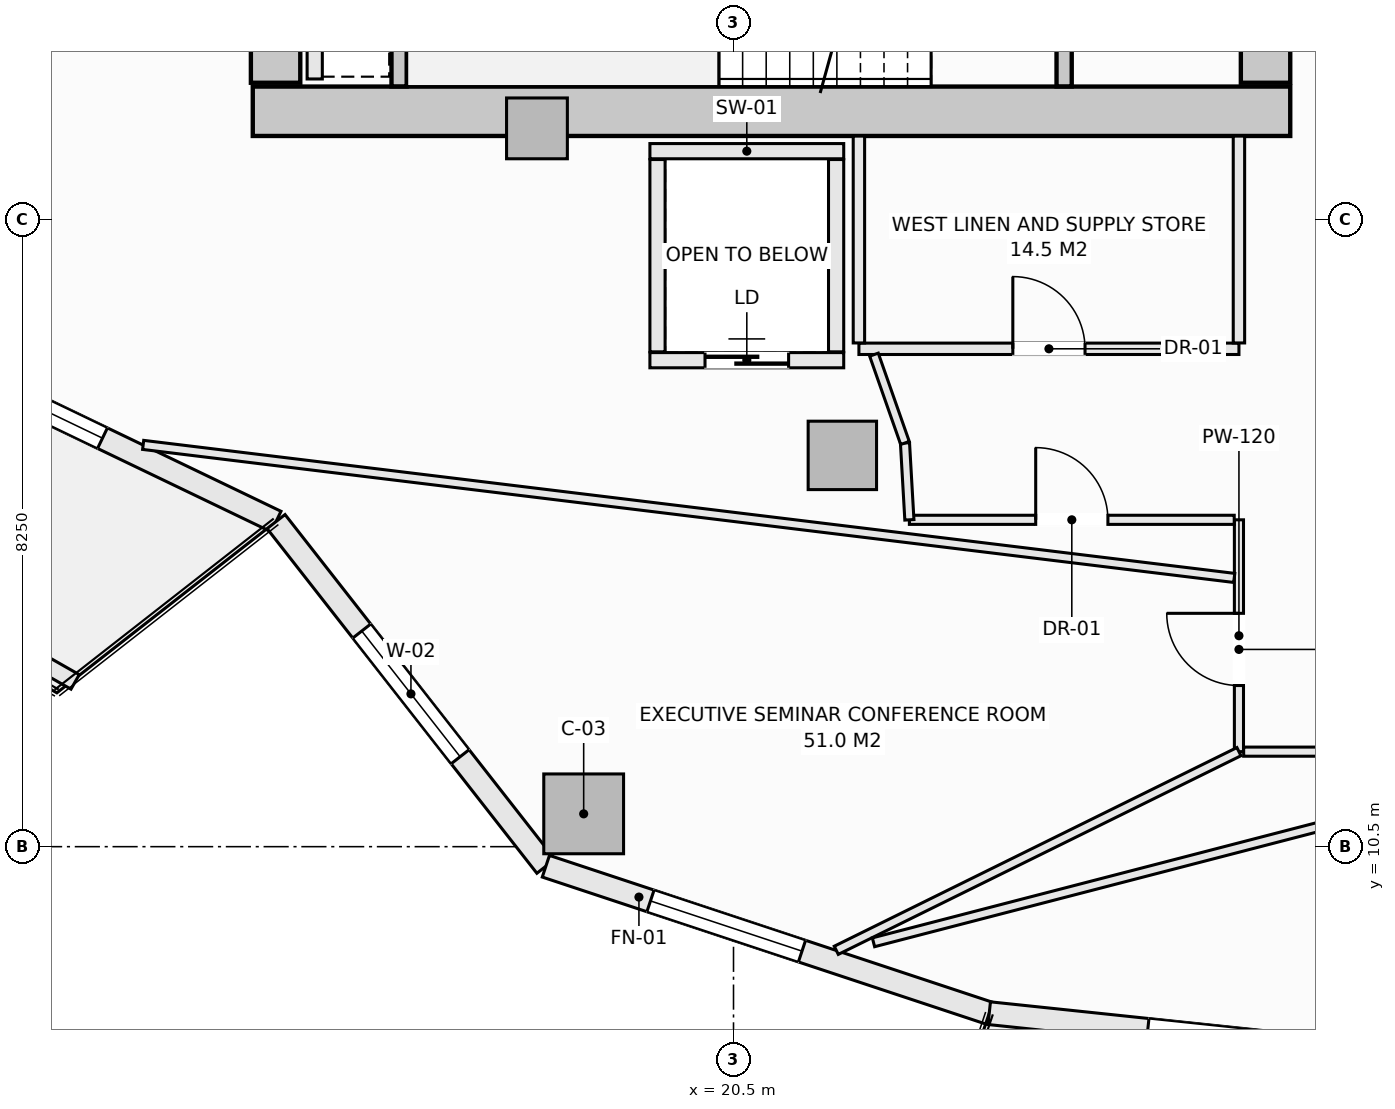
"""IFC4 building model, lengths in metres.
Left out: names, types, materials, properties, quantities, classifications, styles, units other than length and angle.
Written with IfcOpenShell. Run it as: python <this file> out.ifc"""

import sys

from ifc_helpers import new_model, si_unit, direction, frame, frame_2d, origin, origin_2d, place, context, subcontext, project, spatial, rectangle, extrude, element, fill, save


model = new_model("IFC4")
c1 = context("Model", 3, precision=1e-05, world=origin(), true_north=direction((0.0, 1.0)))
c2 = subcontext(c1, "Body", "Model", "MODEL_VIEW")
j1 = project(units=[si_unit("LENGTHUNIT", "METRE"), si_unit("PLANEANGLEUNIT", "RADIAN")], contexts=[c1])
p1 = place(None, origin())
s1 = spatial("IfcSite", under=j1, at=p1, CompositionType="ELEMENT")
p2 = place(p1, origin())
s2 = spatial("IfcBuilding", under=s1, at=p2, CompositionType="ELEMENT")
p3 = place(p2, frame((0.0, 0.0, 118.9)))
s3 = spatial("IfcBuildingStorey", under=s2, at=p3, CompositionType="ELEMENT", Elevation=118.9)
p4 = place(p3, frame((14.175, 20.175, -0.27), z_axis=(0.0, 0.0, 1.0), x_axis=(1.0, 0.0, 0.0)))
e1 = element("IfcWall", 1, at=p4, inside=s3, PredefinedType="SHEAR", context=c2, shape_type="SweptSolid", body=[
    extrude(rectangle(XDim=13.65, YDim=0.65, at=frame_2d((6.825, 0.0))), origin(), (0.0, 0.0, 1.0), 3.4),
])
p5 = place(p3, frame((14.475, 20.55, -0.27), z_axis=(0.0, 0.0, 1.0), x_axis=(0.0, 1.0, 0.0)))
e2 = element("IfcWall", 2, at=p5, inside=s3, PredefinedType="SHEAR", context=c2, shape_type="SweptSolid", body=[
    extrude(rectangle(XDim=12.9, YDim=0.65, at=frame_2d((6.45, 0.0))), origin(), (0.0, 0.0, 1.0), 3.4),
])
p6 = place(p3, frame((27.5, 20.55, -0.27), z_axis=(0.0, 0.0, 1.0), x_axis=(0.0, 1.0, 0.0)))
e3 = element("IfcWall", 3, at=p6, inside=s3, PredefinedType="SHEAR", context=c2, shape_type="SweptSolid", body=[
    extrude(rectangle(XDim=1.5, YDim=0.65, at=frame_2d((0.75, 0.0))), origin(), (0.0, 0.0, 1.0), 3.4),
])
p7 = place(p3, frame((18.529, 10.932, -0.27), z_axis=(0.0, 0.0, 1.0), x_axis=(1.0, 0.0, 0.0)))
e4 = element("IfcColumn", 4, at=p7, inside=s3, PredefinedType="COLUMN", context=c2, shape_type="SweptSolid", body=[
    extrude(rectangle(XDim=1.05, YDim=1.05, at=origin_2d()), origin(), (0.0, 0.0, 1.0), 3.4),
])
p8 = place(p3, frame((21.932, 15.648, -0.27), z_axis=(0.0, 0.0, 1.0), x_axis=(1.0, 0.0, 0.0)))
e5 = element("IfcColumn", 5, at=p8, inside=s3, PredefinedType="COLUMN", context=c2, shape_type="SweptSolid", body=[
    extrude(rectangle(XDim=0.9, YDim=0.9, at=origin_2d()), origin(), (0.0, 0.0, 1.0), 3.4),
])
p9 = place(p3, frame((17.914, 19.95, -0.27), z_axis=(0.0, 0.0, 1.0), x_axis=(1.0, 0.0, 0.0)))
e6 = element("IfcColumn", 6, at=p9, inside=s3, PredefinedType="PILASTER", context=c2, shape_type="SweptSolid", body=[
    extrude(rectangle(XDim=0.8, YDim=0.8, at=origin_2d()), origin(), (0.0, 0.0, 1.0), 3.4),
])
p10 = place(p3, frame((9.178, 17.325, 0.0), z_axis=(0.0, 0.0, 1.0), x_axis=(0.901370184739, -0.433049408339, 0.0)))
e7 = element("IfcWall", 7, at=p10, inside=s3, PredefinedType="SOLIDWALL", context=c2, shape_type="SweptSolid", body=[
    extrude(rectangle(XDim=5.884, YDim=0.3, at=frame_2d((2.942, 0.0))), origin(), (0.0, 0.0, 1.0), 2.653),
])
p11 = place(p10, frame((1.25, 0.0, 0.74)))
e8 = element("IfcOpeningElement", 8, at=p11, cuts=e7, PredefinedType="OPENING", context=c2, shape_type="SweptSolid", body=[
    extrude(rectangle(XDim=2.1, YDim=1.7, at=frame_2d((1.05, 0.85))), frame((0.0, 0.16, 0.0), z_axis=(0.0, -1.0, 0.0), x_axis=(1.0, 0.0, 0.0)), (0.0, 0.0, 1.0), 0.32),
])
p12 = place(p3, frame((14.481, 14.777, 0.0), z_axis=(0.0, 0.0, 1.0), x_axis=(0.616435134162, -0.787405693001, 0.0)))
e9 = element("IfcWall", 9, at=p12, inside=s3, PredefinedType="SOLIDWALL", context=c2, shape_type="SweptSolid", body=[
    extrude(rectangle(XDim=5.759, YDim=0.3, at=frame_2d((2.879, 0.0))), origin(), (0.0, 0.0, 1.0), 2.653),
])
p13 = place(p12, frame((1.829, 0.0, 0.74)))
e10 = element("IfcOpeningElement", 10, at=p13, cuts=e9, PredefinedType="OPENING", context=c2, shape_type="SweptSolid", body=[
    extrude(rectangle(XDim=2.1, YDim=1.7, at=frame_2d((1.05, 0.85))), frame((0.0, 0.16, 0.0), z_axis=(0.0, -1.0, 0.0), x_axis=(1.0, 0.0, 0.0)), (0.0, 0.0, 1.0), 0.32),
])
p14 = place(p3, frame((18.031, 10.242, 0.0), z_axis=(0.0, 0.0, 1.0), x_axis=(0.949238009374, -0.314558741032, 0.0)))
e11 = element("IfcWall", 11, at=p14, inside=s3, PredefinedType="SOLIDWALL", context=c2, shape_type="SweptSolid", body=[
    extrude(rectangle(XDim=6.146, YDim=0.3, at=frame_2d((3.073, 0.0))), origin(), (0.0, 0.0, 1.0), 2.653),
])
p15 = place(p14, frame((1.45, 0.0, 0.74)))
e12 = element("IfcOpeningElement", 12, at=p15, cuts=e11, PredefinedType="OPENING", context=c2, shape_type="SweptSolid", body=[
    extrude(rectangle(XDim=2.1, YDim=1.7, at=frame_2d((1.05, 0.85))), frame((0.0, 0.16, 0.0), z_axis=(0.0, -1.0, 0.0), x_axis=(1.0, 0.0, 0.0)), (0.0, 0.0, 1.0), 0.32),
])
p16 = place(p3, frame((23.865, 8.309, 0.0), z_axis=(0.0, 0.0, 1.0), x_axis=(0.994498012394, -0.104755445421, 0.0)))
e13 = element("IfcWall", 13, at=p16, inside=s3, PredefinedType="SOLIDWALL", context=c2, shape_type="SweptSolid", body=[
    extrude(rectangle(XDim=6.295, YDim=0.3, at=frame_2d((3.147, 0.0))), origin(), (0.0, 0.0, 1.0), 2.653),
])
p17 = place(p16, frame((2.097, 0.0, 0.74)))
e14 = element("IfcOpeningElement", 14, at=p17, cuts=e13, PredefinedType="OPENING", context=c2, shape_type="SweptSolid", body=[
    extrude(rectangle(XDim=2.1, YDim=1.7, at=frame_2d((1.05, 0.85))), frame((0.0, 0.16, 0.0), z_axis=(0.0, -1.0, 0.0), x_axis=(1.0, 0.0, 0.0)), (0.0, 0.0, 1.0), 0.32),
])
p18 = place(p3, frame((6.095, 15.934, 0.0), z_axis=(0.0, 0.0, 1.0), x_axis=(0.869187658335, -0.494482370361, 0.0)))
e15 = element("IfcWall", 15, at=p18, inside=s3, PredefinedType="PARAPET", context=c2, shape_type="SweptSolid", body=[
    extrude(rectangle(XDim=6.606, YDim=0.22, at=frame_2d((3.303, 0.0))), origin(), (0.0, 0.0, 1.0), 0.52),
])
p19 = place(p3, frame((24.85, 20.502, -0.27), z_axis=(0.0, 0.0, 1.0), x_axis=(0.0, 1.0, 0.0)))
e16 = element("IfcWall", 16, at=p19, inside=s3, PredefinedType="SHEAR", context=c2, shape_type="SweptSolid", body=[
    extrude(rectangle(XDim=3.038, YDim=0.2, at=frame_2d((1.519, 0.0))), origin(), (0.0, 0.0, 1.0), 3.4),
])
p20 = place(p19, frame((0.969, 0.0, 0.27)))
e17 = element("IfcOpeningElement", 17, at=p20, cuts=e16, PredefinedType="OPENING", context=c2, shape_type="SweptSolid", body=[
    extrude(rectangle(XDim=1.1, YDim=2.15, at=frame_2d((0.55, 1.075))), frame((0.0, 0.11, 0.0), z_axis=(0.0, -1.0, 0.0), x_axis=(1.0, 0.0, 0.0)), (0.0, 0.0, 1.0), 0.22),
])
p21 = place(p3, frame((16.1, 20.502, -0.27), z_axis=(0.0, 0.0, 1.0), x_axis=(0.0, 1.0, 0.0)))
e18 = element("IfcWall", 18, at=p21, inside=s3, PredefinedType="SHEAR", context=c2, shape_type="SweptSolid", body=[
    extrude(rectangle(XDim=3.036, YDim=0.2, at=frame_2d((1.518, 0.0))), origin(), (0.0, 0.0, 1.0), 3.4),
])
p22 = place(p3, frame((19.4, 19.65, 0.0), z_axis=(0.0, 0.0, 1.0), x_axis=(1.0, 0.0, 0.0)))
e19 = element("IfcWall", 19, at=p22, inside=s3, PredefinedType="SOLIDWALL", context=c2, shape_type="SweptSolid", body=[
    extrude(rectangle(XDim=2.55, YDim=0.2, at=frame_2d((1.275, 0.0))), origin(), (0.0, 0.0, 1.0), 3.13),
])
p23 = place(p3, frame((19.4, 16.9, 0.0), z_axis=(0.0, 0.0, 1.0), x_axis=(1.0, 0.0, 0.0)))
e20 = element("IfcWall", 20, at=p23, inside=s3, PredefinedType="SOLIDWALL", context=c2, shape_type="SweptSolid", body=[
    extrude(rectangle(XDim=2.55, YDim=0.2, at=frame_2d((1.275, 0.0))), origin(), (0.0, 0.0, 1.0), 3.13),
])
p24 = place(p23, frame((0.725, 0.0, 0.0)))
e21 = element("IfcOpeningElement", 21, at=p24, cuts=e20, PredefinedType="OPENING", context=c2, shape_type="SweptSolid", body=[
    extrude(rectangle(XDim=1.1, YDim=2.2, at=frame_2d((0.55, 1.1))), frame((0.0, 0.11, 0.0), z_axis=(0.0, -1.0, 0.0), x_axis=(1.0, 0.0, 0.0)), (0.0, 0.0, 1.0), 0.22),
])
for number, where, z_axis, x_axis in (
    (22, (19.5, 17.01, 0.0), (0.0, 0.0, 1.0), (0.0, 1.0, 0.0)),
    (23, (21.85, 17.01, 0.0), (0.0, 0.0, 1.0), (0.0, 1.0, 0.0)),
):
    element("IfcWall", number, at=place(p3, frame(where, z_axis=z_axis, x_axis=x_axis)), inside=s3, PredefinedType="SOLIDWALL", context=c2, shape_type="SweptSolid", body=[
        extrude(rectangle(XDim=2.53, YDim=0.2, at=frame_2d((1.265, 0.0))), origin(), (0.0, 0.0, 1.0), 3.13),
    ])
p25 = place(p3, frame((14.99, 20.6, 0.0), z_axis=(0.0, 0.0, 1.0), x_axis=(0.0, 1.0, 0.0)))
e24 = element("IfcWall", 24, at=p25, inside=s3, PredefinedType="SOLIDWALL", context=c2, shape_type="SweptSolid", body=[
    extrude(rectangle(XDim=2.85, YDim=0.2, at=frame_2d((1.425, 0.0))), origin(), (0.0, 0.0, 1.0), 3.13),
])
p26 = place(p3, frame((22.15, 17.05, 0.0), z_axis=(0.0, 0.0, 1.0), x_axis=(1.0, 0.0, 0.0)))
e25 = element("IfcWall", 25, at=p26, inside=s3, PredefinedType="PARTITIONING", context=c2, shape_type="SweptSolid", body=[
    extrude(rectangle(XDim=5.0, YDim=0.15, at=frame_2d((2.5, 0.0))), origin(), (0.0, 0.0, 1.0), 3.13),
])
p27 = place(p26, frame((2.025, 0.0, 0.0)))
e26 = element("IfcOpeningElement", 26, at=p27, cuts=e25, PredefinedType="OPENING", context=c2, shape_type="SweptSolid", body=[
    extrude(rectangle(XDim=0.95, YDim=2.1, at=frame_2d((0.475, 1.05))), frame((0.0, 0.085, 0.0), z_axis=(0.0, -1.0, 0.0), x_axis=(1.0, 0.0, 0.0)), (0.0, 0.0, 1.0), 0.17),
])
p28 = place(p3, frame((22.15, 17.127, 0.0), z_axis=(0.0, 0.0, 1.0), x_axis=(0.0, 1.0, 0.0)))
e27 = element("IfcWall", 27, at=p28, inside=s3, PredefinedType="PARTITIONING", context=c2, shape_type="SweptSolid", body=[
    extrude(rectangle(XDim=2.721, YDim=0.15, at=frame_2d((1.36, 0.0))), origin(), (0.0, 0.0, 1.0), 3.13),
])
p29 = place(p3, frame((27.15, 11.75, 0.0), z_axis=(0.0, 0.0, 1.0), x_axis=(0.0, 1.0, 0.0)))
e28 = element("IfcWall", 28, at=p29, inside=s3, PredefinedType="PARTITIONING", context=c2, shape_type="SweptSolid", body=[
    extrude(rectangle(XDim=3.05, YDim=0.12, at=frame_2d((1.525, 0.0))), origin(), (0.0, 0.0, 1.0), 3.13),
])
p30 = place(p29, frame((0.87, 0.0, 0.0)))
e29 = element("IfcOpeningElement", 29, at=p30, cuts=e28, PredefinedType="OPENING", context=c2, shape_type="SweptSolid", body=[
    extrude(rectangle(XDim=0.95, YDim=2.1, at=frame_2d((0.475, 1.05))), frame((0.0, 0.07, 0.0), z_axis=(0.0, -1.0, 0.0), x_axis=(1.0, 0.0, 0.0)), (0.0, 0.0, 1.0), 0.14),
])
p31 = place(p3, frame((27.15, 17.127, 0.0), z_axis=(0.0, 0.0, 1.0), x_axis=(0.0, 1.0, 0.0)))
e30 = element("IfcWall", 30, at=p31, inside=s3, PredefinedType="PARTITIONING", context=c2, shape_type="SweptSolid", body=[
    extrude(rectangle(XDim=2.721, YDim=0.15, at=frame_2d((1.36, 0.0))), origin(), (0.0, 0.0, 1.0), 3.13),
])
p32 = place(p3, frame((27.212, 11.75, 0.0), z_axis=(0.0, 0.0, 1.0), x_axis=(1.0, 0.0, 0.0)))
e31 = element("IfcWall", 31, at=p32, inside=s3, PredefinedType="PARTITIONING", context=c2, shape_type="SweptSolid", body=[
    extrude(rectangle(XDim=8.676, YDim=0.12, at=frame_2d((4.338, 0.0))), origin(), (0.0, 0.0, 1.0), 3.13),
])
p33 = place(p32, frame((5.701, 0.0, 0.0)))
e32 = element("IfcOpeningElement", 32, at=p33, cuts=e31, PredefinedType="OPENING", context=c2, shape_type="SweptSolid", body=[
    extrude(rectangle(XDim=0.95, YDim=2.1, at=frame_2d((0.475, 1.05))), frame((0.0, 0.07, 0.0), z_axis=(0.0, -1.0, 0.0), x_axis=(1.0, 0.0, 0.0)), (0.0, 0.0, 1.0), 0.14),
])
p34 = place(p3, frame((22.814, 14.8, 0.0), z_axis=(0.0, 0.0, 1.0), x_axis=(1.0, 0.0, 0.0)))
e33 = element("IfcWall", 33, at=p34, inside=s3, PredefinedType="PARTITIONING", context=c2, shape_type="SweptSolid", body=[
    extrude(rectangle(XDim=4.274, YDim=0.12, at=frame_2d((2.137, 0.0))), origin(), (0.0, 0.0, 1.0), 3.13),
])
p35 = place(p34, frame((1.662, 0.0, 0.0)))
e34 = element("IfcOpeningElement", 34, at=p35, cuts=e33, PredefinedType="OPENING", context=c2, shape_type="SweptSolid", body=[
    extrude(rectangle(XDim=0.95, YDim=2.1, at=frame_2d((0.475, 1.05))), frame((0.0, 0.07, 0.0), z_axis=(0.0, -1.0, 0.0), x_axis=(1.0, 0.0, 0.0)), (0.0, 0.0, 1.0), 0.14),
])
p36 = place(p3, frame((22.756, 15.811, 0.0), z_axis=(0.0, 0.0, 1.0), x_axis=(0.057139047697, -0.998366230012, 0.0)))
e35 = element("IfcWall", 35, at=p36, inside=s3, PredefinedType="PARTITIONING", context=c2, shape_type="SweptSolid", body=[
    extrude(rectangle(XDim=1.013, YDim=0.12, at=frame_2d((0.506, 0.0))), origin(), (0.0, 0.0, 1.0), 3.13),
])
p37 = place(p3, frame((22.348, 16.973, 0.0), z_axis=(0.0, 0.0, 1.0), x_axis=(0.331471687044, -0.943465166653, 0.0)))
e36 = element("IfcWall", 36, at=p37, inside=s3, PredefinedType="PARTITIONING", context=c2, shape_type="SweptSolid", body=[
    extrude(rectangle(XDim=1.231, YDim=0.12, at=frame_2d((0.616, 0.0))), origin(), (0.0, 0.0, 1.0), 3.13),
])
p38 = place(p3, frame((12.733, 15.786, 0.0), z_axis=(0.0, 0.0, 1.0), x_axis=(0.992651170815, -0.121010962642, 0.0)))
e37 = element("IfcWall", 37, at=p38, inside=s3, PredefinedType="PARTITIONING", context=c2, shape_type="SweptSolid", body=[
    extrude(rectangle(XDim=14.461, YDim=0.12, at=frame_2d((7.231, 0.0))), origin(), (0.0, 0.0, 1.0), 2.812),
])
p39 = place(p3, frame((21.852, 9.136, 0.0), z_axis=(0.0, 0.0, 1.0), x_axis=(0.896811350554, 0.442413157036, 0.0)))
e38 = element("IfcWall", 38, at=p39, inside=s3, PredefinedType="PARTITIONING", context=c2, shape_type="SweptSolid", body=[
    extrude(rectangle(XDim=5.907, YDim=0.12, at=frame_2d((2.954, 0.0))), origin(), (0.0, 0.0, 1.0), 2.653),
])
p40 = place(p3, frame((22.342, 9.242, 0.0), z_axis=(0.0, 0.0, 1.0), x_axis=(0.967982801211, 0.251016526466, 0.0)))
e39 = element("IfcWall", 39, at=p40, inside=s3, PredefinedType="PARTITIONING", context=c2, shape_type="SweptSolid", body=[
    extrude(rectangle(XDim=9.506, YDim=0.12, at=frame_2d((4.753, 0.0))), origin(), (0.0, 0.0, 1.0), 2.653),
])
p41 = place(p11, origin())
e40 = element("IfcWindow", 40, at=p41, inside=s3, PartitioningType="SINGLE_PANEL", PredefinedType="WINDOW", context=c2, shape_type="SweptSolid", body=[
    extrude(rectangle(XDim=2.1, YDim=1.7, at=frame_2d((1.05, 0.85))), frame((0.0, 0.03, 0.0), z_axis=(0.0, -1.0, 0.0), x_axis=(1.0, 0.0, 0.0)), (0.0, 0.0, 1.0), 0.06),
])
fill(e8, e40)
p42 = place(p13, origin())
e41 = element("IfcWindow", 41, at=p42, inside=s3, PartitioningType="SINGLE_PANEL", PredefinedType="WINDOW", context=c2, shape_type="SweptSolid", body=[
    extrude(rectangle(XDim=2.1, YDim=1.7, at=frame_2d((1.05, 0.85))), frame((0.0, 0.03, 0.0), z_axis=(0.0, -1.0, 0.0), x_axis=(1.0, 0.0, 0.0)), (0.0, 0.0, 1.0), 0.06),
])
fill(e10, e41)
p43 = place(p15, origin())
e42 = element("IfcWindow", 42, at=p43, inside=s3, PartitioningType="SINGLE_PANEL", PredefinedType="WINDOW", context=c2, shape_type="SweptSolid", body=[
    extrude(rectangle(XDim=2.1, YDim=1.7, at=frame_2d((1.05, 0.85))), frame((0.0, 0.03, 0.0), z_axis=(0.0, -1.0, 0.0), x_axis=(1.0, 0.0, 0.0)), (0.0, 0.0, 1.0), 0.06),
])
fill(e12, e42)
p44 = place(p17, origin())
e43 = element("IfcWindow", 43, at=p44, inside=s3, PartitioningType="SINGLE_PANEL", PredefinedType="WINDOW", context=c2, shape_type="SweptSolid", body=[
    extrude(rectangle(XDim=2.1, YDim=1.7, at=frame_2d((1.05, 0.85))), frame((0.0, 0.03, 0.0), z_axis=(0.0, -1.0, 0.0), x_axis=(1.0, 0.0, 0.0)), (0.0, 0.0, 1.0), 0.06),
])
fill(e14, e43)
p45 = place(p24, origin())
e44 = element("IfcDoor", 44, at=p45, inside=s3, OperationType="SLIDING_TO_LEFT", PredefinedType="DOOR", context=c2, shape_type="SweptSolid", body=[
    extrude(rectangle(XDim=1.1, YDim=2.2, at=frame_2d((0.55, 1.1))), frame((0.0, 0.025, 0.0), z_axis=(0.0, -1.0, 0.0), x_axis=(1.0, 0.0, 0.0)), (0.0, 0.0, 1.0), 0.05),
])
fill(e21, e44)
p46 = place(p27, origin())
e45 = element("IfcDoor", 45, at=p46, inside=s3, OperationType="SINGLE_SWING_LEFT", PredefinedType="DOOR", context=c2, shape_type="SweptSolid", body=[
    extrude(rectangle(XDim=0.95, YDim=2.1, at=frame_2d((0.475, 1.05))), frame((0.0, 0.025, 0.0), z_axis=(0.0, -1.0, 0.0), x_axis=(1.0, 0.0, 0.0)), (0.0, 0.0, 1.0), 0.05),
])
fill(e26, e45)
p47 = place(p35, origin())
e46 = element("IfcDoor", 46, at=p47, inside=s3, OperationType="SINGLE_SWING_LEFT", PredefinedType="DOOR", context=c2, shape_type="SweptSolid", body=[
    extrude(rectangle(XDim=0.95, YDim=2.1, at=frame_2d((0.475, 1.05))), frame((0.0, 0.025, 0.0), z_axis=(0.0, -1.0, 0.0), x_axis=(1.0, 0.0, 0.0)), (0.0, 0.0, 1.0), 0.05),
])
fill(e34, e46)
p48 = place(p30, origin())
e47 = element("IfcDoor", 47, at=p48, inside=s3, OperationType="SINGLE_SWING_RIGHT", PredefinedType="DOOR", context=c2, shape_type="SweptSolid", body=[
    extrude(rectangle(XDim=0.95, YDim=2.1, at=frame_2d((0.475, 1.05))), frame((0.0, 0.025, 0.0), z_axis=(0.0, -1.0, 0.0), x_axis=(1.0, 0.0, 0.0)), (0.0, 0.0, 1.0), 0.05),
])
fill(e29, e47)
save(model, sys.argv[1])
